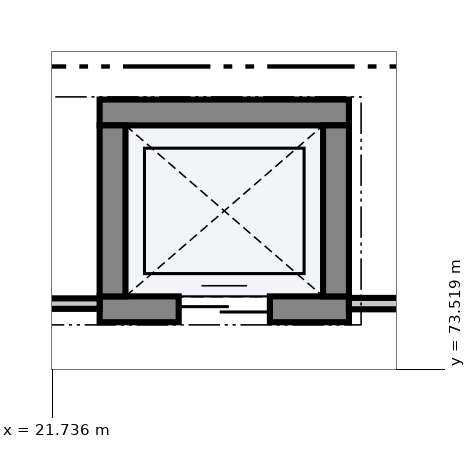
"""IFC4 building model, lengths in metres.
Left out: names, types, materials, properties, quantities, classifications, styles, units other than length and angle.
Written with IfcOpenShell. Run it as: python <this file> out.ifc"""

import sys

from ifc_helpers import new_model, si_unit, direction, frame, frame_2d, origin, place, context, subcontext, project, spatial, rectangle, extrude, element, fill, save


model = new_model("IFC4")
c1 = context("Model", 3, precision=1e-05, world=origin(), true_north=direction((0.0, 1.0)))
c2 = subcontext(c1, "Body", "Model", "MODEL_VIEW")
j1 = project(units=[si_unit("LENGTHUNIT", "METRE"), si_unit("PLANEANGLEUNIT", "RADIAN")], contexts=[c1])
p1 = place(None, origin())
s1 = spatial("IfcSite", under=j1, at=p1, CompositionType="ELEMENT")
p2 = place(p1, origin())
s2 = spatial("IfcBuilding", under=s1, at=p2, CompositionType="ELEMENT")
p3 = place(p2, frame((0.0, 0.0, 5.4)))
s3 = spatial("IfcBuildingStorey", under=s2, at=p3, CompositionType="ELEMENT", Elevation=5.4)
p4 = place(p3, frame((22.36, 74.305, 0.0), z_axis=(0.0, 0.0, 1.0), x_axis=(1.0, 0.0, 0.0)))
e1 = element("IfcWall", 1, at=p4, inside=s3, PredefinedType="SHEAR", context=c2, shape_type="SweptSolid", body=[
    extrude(rectangle(XDim=3.28, YDim=0.34, at=frame_2d((1.64, 0.0))), origin(), (0.0, 0.0, 1.0), 4.505),
])
p5 = place(p4, frame((1.04, 0.0, 0.0)))
e2 = element("IfcOpeningElement", 2, at=p5, cuts=e1, PredefinedType="OPENING", context=c2, shape_type="SweptSolid", body=[
    extrude(rectangle(XDim=1.2, YDim=2.2, at=frame_2d((0.6, 1.1))), frame((0.0, 0.182, 0.0), z_axis=(0.0, -1.0, 0.0), x_axis=(1.0, 0.0, 0.0)), (0.0, 0.0, 1.0), 0.364),
])
p6 = place(p3, frame((22.36, 76.895, 0.0), z_axis=(0.0, 0.0, 1.0), x_axis=(1.0, 0.0, 0.0)))
e3 = element("IfcWall", 3, at=p6, inside=s3, PredefinedType="SHEAR", context=c2, shape_type="SweptSolid", body=[
    extrude(rectangle(XDim=3.28, YDim=0.34, at=frame_2d((1.64, 0.0))), origin(), (0.0, 0.0, 1.0), 4.505),
])
for number, where, z_axis, x_axis in (
    (4, (22.53, 74.475, 0.0), (0.0, 0.0, 1.0), (0.0, 1.0, 0.0)),
    (5, (25.47, 74.475, 0.0), (0.0, 0.0, 1.0), (0.0, 1.0, 0.0)),
):
    element("IfcWall", number, at=place(p3, frame(where, z_axis=z_axis, x_axis=x_axis)), inside=s3, PredefinedType="SHEAR", context=c2, shape_type="SweptSolid", body=[
        extrude(rectangle(XDim=2.25, YDim=0.34, at=frame_2d((1.125, 0.0))), origin(), (0.0, 0.0, 1.0), 4.505),
    ])
p7 = place(p3, frame((48.02, 74.38, 0.0), z_axis=(0.0, 0.0, 1.0), x_axis=(-1.0, 0.0, 0.0)))
e6 = element("IfcWall", 6, at=p7, inside=s3, PredefinedType="PARTITIONING", context=c2, shape_type="SweptSolid", body=[
    extrude(rectangle(XDim=22.38, YDim=0.15, at=frame_2d((11.19, 0.0))), origin(), (0.0, 0.0, 1.0), 3.445),
])
p8 = place(p7, frame((9.937, 0.0, 0.0)))
e7 = element("IfcOpeningElement", 7, at=p8, cuts=e6, PredefinedType="OPENING", context=c2, shape_type="SweptSolid", body=[
    extrude(rectangle(XDim=2.1, YDim=2.42, at=frame_2d((1.05, 1.21))), frame((0.0, 0.087, 0.0), z_axis=(0.0, -1.0, 0.0), x_axis=(1.0, 0.0, 0.0)), (0.0, 0.0, 1.0), 0.174),
])
p9 = place(p3, frame((22.36, 74.38, 0.0), z_axis=(0.0, 0.0, 1.0), x_axis=(-1.0, 0.0, 0.0)))
e8 = element("IfcWall", 8, at=p9, inside=s3, PredefinedType="PARTITIONING", context=c2, shape_type="SweptSolid", body=[
    extrude(rectangle(XDim=6.32, YDim=0.138, at=frame_2d((3.16, 0.0))), origin(), (0.0, 0.0, 1.0), 3.445),
])
p10 = place(p5, origin())
e9 = element("IfcDoor", 9, at=p10, inside=s3, OperationType="DOUBLE_DOOR_SLIDING", PredefinedType="DOOR", context=c2, shape_type="SweptSolid", body=[
    extrude(rectangle(XDim=1.2, YDim=2.2, at=frame_2d((0.6, 1.1))), frame((0.0, 0.025, 0.0), z_axis=(0.0, -1.0, 0.0), x_axis=(1.0, 0.0, 0.0)), (0.0, 0.0, 1.0), 0.05),
])
fill(e2, e9)
save(model, sys.argv[1])
